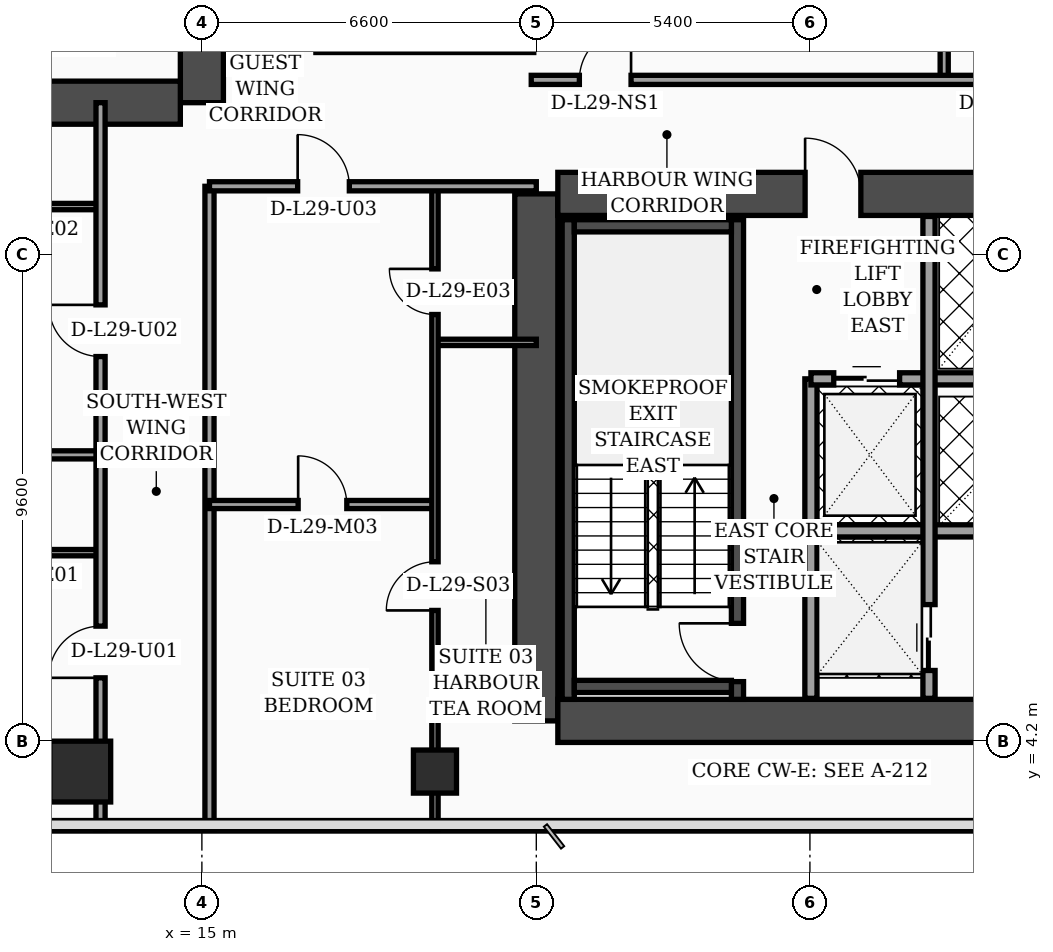
"""IFC4 building model, lengths in metres.
Left out: names, types, materials, properties, quantities, classifications, styles, units other than length and angle.
Written with IfcOpenShell. Run it as: python <this file> out.ifc"""

import sys

from ifc_helpers import new_model, si_unit, direction, frame, frame_2d, origin, origin_2d, place, context, subcontext, project, spatial, rectangle, hollow_rectangle, extrude, element, fill, save


model = new_model("IFC4")
c1 = context("Model", 3, precision=1e-05, world=origin(), true_north=direction((0.0, 1.0)))
c2 = subcontext(c1, "Body", "Model", "MODEL_VIEW")
j1 = project(units=[si_unit("LENGTHUNIT", "METRE"), si_unit("PLANEANGLEUNIT", "RADIAN")], contexts=[c1])
p1 = place(None, origin())
s1 = spatial("IfcSite", under=j1, at=p1, CompositionType="ELEMENT")
p2 = place(p1, origin())
s2 = spatial("IfcBuilding", under=s1, at=p2, CompositionType="ELEMENT")
p3 = place(p2, frame((0.0, 0.0, 120.2)))
s3 = spatial("IfcBuildingStorey", under=s2, at=p3, CompositionType="ELEMENT", Elevation=120.2)
p4 = place(p3, frame((15.0, 16.8, 0.0), z_axis=(0.0, 0.0, 1.0), x_axis=(0.0, 1.0, 0.0)))
e1 = element("IfcWall", 1, at=p4, inside=s3, PredefinedType="SHEAR", context=c2, shape_type="SweptSolid", body=[
    extrude(rectangle(XDim=21.6, YDim=0.85, at=frame_2d((10.8, 0.0))), origin(), (0.0, 0.0, 1.0), 3.56),
])
p5 = place(p4, frame((8.65, 0.0, 0.0)))
e2 = element("IfcOpeningElement", 2, at=p5, cuts=e1, PredefinedType="OPENING", context=c2, shape_type="SweptSolid", body=[
    extrude(rectangle(XDim=1.1, YDim=2.2, at=frame_2d((0.55, 1.1))), frame((0.0, 0.435, 0.0), z_axis=(0.0, -1.0, 0.0), x_axis=(1.0, 0.0, 0.0)), (0.0, 0.0, 1.0), 0.87),
])
p6 = place(p4, frame((10.85, 0.0, 0.0)))
e3 = element("IfcOpeningElement", 3, at=p6, cuts=e1, PredefinedType="OPENING", context=c2, shape_type="SweptSolid", body=[
    extrude(rectangle(XDim=1.1, YDim=2.2, at=frame_2d((0.55, 1.1))), frame((0.0, 0.435, 0.0), z_axis=(0.0, -1.0, 0.0), x_axis=(1.0, 0.0, 0.0)), (0.0, 0.0, 1.0), 0.87),
])
p7 = place(p4, frame((13.5, 0.0, 0.0)))
e4 = element("IfcOpeningElement", 4, at=p7, cuts=e1, PredefinedType="OPENING", context=c2, shape_type="SweptSolid", body=[
    extrude(rectangle(XDim=1.1, YDim=2.2, at=frame_2d((0.55, 1.1))), frame((0.0, 0.435, 0.0), z_axis=(0.0, -1.0, 0.0), x_axis=(1.0, 0.0, 0.0)), (0.0, 0.0, 1.0), 0.87),
])
p8 = place(p4, frame((16.15, 0.0, 0.0)))
e5 = element("IfcOpeningElement", 5, at=p8, cuts=e1, PredefinedType="OPENING", context=c2, shape_type="SweptSolid", body=[
    extrude(rectangle(XDim=1.1, YDim=2.2, at=frame_2d((0.55, 1.1))), frame((0.0, 0.435, 0.0), z_axis=(0.0, -1.0, 0.0), x_axis=(1.0, 0.0, 0.0)), (0.0, 0.0, 1.0), 0.87),
])
p9 = place(p3, frame((4.625, 16.8, 0.0), z_axis=(0.0, 0.0, 1.0), x_axis=(1.0, 0.0, 0.0)))
e6 = element("IfcWall", 6, at=p9, inside=s3, PredefinedType="SHEAR", context=c2, shape_type="SweptSolid", body=[
    extrude(rectangle(XDim=9.95, YDim=0.85, at=frame_2d((4.975, 0.0))), origin(), (0.0, 0.0, 1.0), 3.56),
])
p10 = place(p3, frame((21.6, 4.6, 0.0), z_axis=(0.0, 0.0, 1.0), x_axis=(0.0, 1.0, 0.0)))
e7 = element("IfcWall", 7, at=p10, inside=s3, PredefinedType="SHEAR", context=c2, shape_type="SweptSolid", body=[
    extrude(rectangle(XDim=10.4, YDim=0.85, at=frame_2d((5.2, 0.0))), origin(), (0.0, 0.0, 1.0), 3.56),
])
p11 = place(p3, frame((22.025, 15.0, 0.0), z_axis=(0.0, 0.0, 1.0), x_axis=(1.0, 0.0, 0.0)))
e8 = element("IfcWall", 8, at=p11, inside=s3, PredefinedType="SHEAR", context=c2, shape_type="SweptSolid", body=[
    extrude(rectangle(XDim=9.95, YDim=0.85, at=frame_2d((4.975, 0.0))), origin(), (0.0, 0.0, 1.0), 3.56),
])
p12 = place(p11, frame((4.88, 0.0, 0.0)))
e9 = element("IfcOpeningElement", 9, at=p12, cuts=e8, PredefinedType="OPENING", context=c2, shape_type="SweptSolid", body=[
    extrude(rectangle(XDim=1.1, YDim=2.2, at=frame_2d((0.55, 1.1))), frame((0.0, 0.435, 0.0), z_axis=(0.0, -1.0, 0.0), x_axis=(1.0, 0.0, 0.0)), (0.0, 0.0, 1.0), 0.87),
])
p13 = place(p3, frame((22.025, 4.6, 0.0), z_axis=(0.0, 0.0, 1.0), x_axis=(1.0, 0.0, 0.0)))
e10 = element("IfcWall", 10, at=p13, inside=s3, PredefinedType="SHEAR", context=c2, shape_type="SweptSolid", body=[
    extrude(rectangle(XDim=9.95, YDim=0.85, at=frame_2d((4.975, 0.0))), origin(), (0.0, 0.0, 1.0), 3.56),
])
p14 = place(p3, frame((22.23, 5.025, 0.0), z_axis=(0.0, 0.0, 1.0), x_axis=(0.0, 1.0, 0.0)))
e11 = element("IfcWall", 11, at=p14, inside=s3, PredefinedType="SOLIDWALL", context=c2, shape_type="SweptSolid", body=[
    extrude(rectangle(XDim=9.465, YDim=0.24, at=frame_2d((4.732, 0.0))), origin(), (0.0, 0.0, 1.0), 3.56),
])
p15 = place(p3, frame((25.57, 5.025, 0.0), z_axis=(0.0, 0.0, 1.0), x_axis=(0.0, 1.0, 0.0)))
e12 = element("IfcWall", 12, at=p15, inside=s3, PredefinedType="SOLIDWALL", context=c2, shape_type="SweptSolid", body=[
    extrude(rectangle(XDim=9.465, YDim=0.24, at=frame_2d((4.732, 0.0))), origin(), (0.0, 0.0, 1.0), 3.56),
])
p16 = place(p15, frame((0.35, 0.0, 0.0)))
e13 = element("IfcOpeningElement", 13, at=p16, cuts=e12, PredefinedType="OPENING", context=c2, shape_type="SweptSolid", body=[
    extrude(rectangle(XDim=1.15, YDim=2.2, at=frame_2d((0.575, 1.1))), frame((0.0, 0.13, 0.0), z_axis=(0.0, -1.0, 0.0), x_axis=(1.0, 0.0, 0.0)), (0.0, 0.0, 1.0), 0.26),
])
for number, where, z_axis, x_axis in (
    (14, (22.35, 5.28, 0.0), (0.0, 0.0, 1.0), (1.0, 0.0, 0.0)),
    (15, (22.35, 14.37, 0.0), (0.0, 0.0, 1.0), (1.0, 0.0, 0.0)),
):
    element("IfcWall", number, at=place(p3, frame(where, z_axis=z_axis, x_axis=x_axis)), inside=s3, PredefinedType="SOLIDWALL", context=c2, shape_type="SweptSolid", body=[
        extrude(rectangle(XDim=3.1, YDim=0.24, at=frame_2d((1.55, 0.0))), origin(), (0.0, 0.0, 1.0), 3.56),
    ])
p17 = place(p3, frame((12.6, 3.6, 0.0), z_axis=(0.0, 0.0, 1.0), x_axis=(1.0, 0.0, 0.0)))
e16 = element("IfcColumn", 16, at=p17, inside=s3, PredefinedType="COLUMN", context=c2, shape_type="SweptSolid", body=[
    extrude(rectangle(XDim=1.2, YDim=1.2, at=origin_2d()), origin(), (0.0, 0.0, 1.0), 3.56),
])
p18 = place(p3, frame((19.6, 3.6, 0.0), z_axis=(0.0, 0.0, 1.0), x_axis=(1.0, 0.0, 0.0)))
e17 = element("IfcColumn", 17, at=p18, inside=s3, PredefinedType="COLUMN", context=c2, shape_type="SweptSolid", body=[
    extrude(hollow_rectangle(XDim=0.85, YDim=0.85, WallThickness=0.036, at=origin_2d()), origin(), (0.0, 0.0, 1.0), 3.56),
])
p19 = place(p3, frame((27.02, 5.045, 0.0), z_axis=(0.0, 0.0, 1.0), x_axis=(0.0, 1.0, 0.0)))
e18 = element("IfcWall", 18, at=p19, inside=s3, PredefinedType="SOLIDWALL", context=c2, shape_type="SweptSolid", body=[
    extrude(rectangle(XDim=6.305, YDim=0.24, at=frame_2d((3.153, 0.0))), origin(), (0.0, 0.0, 1.0), 3.56),
])
p20 = place(p3, frame((27.02, 11.35, 0.0), z_axis=(0.0, 0.0, 1.0), x_axis=(1.0, 0.0, 0.0)))
e19 = element("IfcWall", 19, at=p20, inside=s3, PredefinedType="SOLIDWALL", context=c2, shape_type="SweptSolid", body=[
    extrude(rectangle(XDim=4.935, YDim=0.24, at=frame_2d((2.468, 0.0))), origin(), (0.0, 0.0, 1.0), 3.56),
])
p21 = place(p20, frame((0.45, 0.0, 0.0)))
e20 = element("IfcOpeningElement", 20, at=p21, cuts=e19, PredefinedType="OPENING", context=c2, shape_type="SweptSolid", body=[
    extrude(rectangle(XDim=1.3, YDim=2.35, at=frame_2d((0.65, 1.175))), frame((0.0, 0.13, 0.0), z_axis=(0.0, -1.0, 0.0), x_axis=(1.0, 0.0, 0.0)), (0.0, 0.0, 1.0), 0.26),
])
p22 = place(p3, frame((27.02, 8.35, 0.0), z_axis=(0.0, 0.0, 1.0), x_axis=(1.0, 0.0, 0.0)))
e21 = element("IfcWall", 21, at=p22, inside=s3, PredefinedType="SOLIDWALL", context=c2, shape_type="SweptSolid", body=[
    extrude(rectangle(XDim=4.935, YDim=0.24, at=frame_2d((2.468, 0.0))), origin(), (0.0, 0.0, 1.0), 3.09),
])
p23 = place(p3, frame((29.35, 5.045, 0.0), z_axis=(0.0, 0.0, 1.0), x_axis=(0.0, 1.0, 0.0)))
e22 = element("IfcWall", 22, at=p23, inside=s3, PredefinedType="SOLIDWALL", context=c2, shape_type="SweptSolid", body=[
    extrude(rectangle(XDim=9.51, YDim=0.24, at=frame_2d((4.755, 0.0))), origin(), (0.0, 0.0, 1.0), 3.56),
])
p24 = place(p23, frame((0.55, 0.0, 0.0)))
e23 = element("IfcOpeningElement", 23, at=p24, cuts=e22, PredefinedType="OPENING", context=c2, shape_type="SweptSolid", body=[
    extrude(rectangle(XDim=1.3, YDim=2.35, at=frame_2d((0.65, 1.175))), frame((0.0, 0.13, 0.0), z_axis=(0.0, -1.0, 0.0), x_axis=(1.0, 0.0, 0.0)), (0.0, 0.0, 1.0), 0.26),
])
p25 = place(p3, frame((3.2, 7.92, 0.0), z_axis=(0.0, 0.0, 1.0), x_axis=(1.0, 0.0, 0.0)))
e24 = element("IfcWall", 24, at=p25, inside=s3, PredefinedType="PARTITIONING", context=c2, shape_type="SweptSolid", body=[
    extrude(rectangle(XDim=9.8, YDim=0.125, at=frame_2d((4.9, 0.0))), origin(), (0.0, 0.0, 1.0), 2.84),
])
p26 = place(p25, frame((3.32, 0.0, 0.0)))
e25 = element("IfcOpeningElement", 25, at=p26, cuts=e24, PredefinedType="OPENING", context=c2, shape_type="SweptSolid", body=[
    extrude(rectangle(XDim=0.96, YDim=2.2, at=frame_2d((0.48, 1.1))), frame((0.0, 0.073, 0.0), z_axis=(0.0, -1.0, 0.0), x_axis=(1.0, 0.0, 0.0)), (0.0, 0.0, 1.0), 0.145),
])
p27 = place(p25, frame((7.89, 0.0, 0.0)))
e26 = element("IfcOpeningElement", 26, at=p27, cuts=e24, PredefinedType="OPENING", context=c2, shape_type="SweptSolid", body=[
    extrude(rectangle(XDim=0.9, YDim=2.15, at=frame_2d((0.45, 1.075))), frame((0.0, 0.073, 0.0), z_axis=(0.0, -1.0, 0.0), x_axis=(1.0, 0.0, 0.0)), (0.0, 0.0, 1.0), 0.145),
])
p28 = place(p3, frame((0.08, 14.75, 0.0), z_axis=(0.0, 0.0, 1.0), x_axis=(1.0, 0.0, 0.0)))
e27 = element("IfcWall", 27, at=p28, inside=s3, PredefinedType="PARTITIONING", context=c2, shape_type="SweptSolid", body=[
    extrude(rectangle(XDim=12.92, YDim=0.125, at=frame_2d((6.46, 0.0))), origin(), (0.0, 0.0, 1.0), 2.84),
])
p29 = place(p28, frame((4.52, 0.0, 0.0)))
e28 = element("IfcOpeningElement", 28, at=p29, cuts=e27, PredefinedType="OPENING", context=c2, shape_type="SweptSolid", body=[
    extrude(rectangle(XDim=0.96, YDim=2.2, at=frame_2d((0.48, 1.1))), frame((0.0, 0.073, 0.0), z_axis=(0.0, -1.0, 0.0), x_axis=(1.0, 0.0, 0.0)), (0.0, 0.0, 1.0), 0.145),
])
p30 = place(p28, frame((11.01, 0.0, 0.0)))
e29 = element("IfcOpeningElement", 29, at=p30, cuts=e27, PredefinedType="OPENING", context=c2, shape_type="SweptSolid", body=[
    extrude(rectangle(XDim=0.9, YDim=2.15, at=frame_2d((0.45, 1.075))), frame((0.0, 0.073, 0.0), z_axis=(0.0, -1.0, 0.0), x_axis=(1.0, 0.0, 0.0)), (0.0, 0.0, 1.0), 0.145),
])
p31 = place(p3, frame((0.08, 9.85, 0.0), z_axis=(0.0, 0.0, 1.0), x_axis=(1.0, 0.0, 0.0)))
e30 = element("IfcWall", 30, at=p31, inside=s3, PredefinedType="PARTITIONING", context=c2, shape_type="SweptSolid", body=[
    extrude(rectangle(XDim=12.92, YDim=0.16, at=frame_2d((6.46, 0.0))), origin(), (0.0, 0.0, 1.0), 2.84),
])
p32 = place(p3, frame((13.0, 2.44, 0.0), z_axis=(0.0, 0.0, 1.0), x_axis=(0.0, 1.0, 0.0)))
e31 = element("IfcWall", 31, at=p32, inside=s3, PredefinedType="PARTITIONING", context=c2, shape_type="SweptSolid", body=[
    extrude(rectangle(XDim=14.36, YDim=0.18, at=frame_2d((7.18, 0.0))), origin(), (0.0, 0.0, 1.0), 2.84),
])
p33 = place(p32, frame((3.01, 0.0, 0.0)))
e32 = element("IfcOpeningElement", 32, at=p33, cuts=e31, PredefinedType="OPENING", context=c2, shape_type="SweptSolid", body=[
    extrude(rectangle(XDim=1.02, YDim=2.2, at=frame_2d((0.51, 1.1))), frame((0.0, 0.1, 0.0), z_axis=(0.0, -1.0, 0.0), x_axis=(1.0, 0.0, 0.0)), (0.0, 0.0, 1.0), 0.2),
])
p34 = place(p32, frame((9.35, 0.0, 0.0)))
e33 = element("IfcOpeningElement", 33, at=p34, cuts=e31, PredefinedType="OPENING", context=c2, shape_type="SweptSolid", body=[
    extrude(rectangle(XDim=1.02, YDim=2.2, at=frame_2d((0.51, 1.1))), frame((0.0, 0.1, 0.0), z_axis=(0.0, -1.0, 0.0), x_axis=(1.0, 0.0, 0.0)), (0.0, 0.0, 1.0), 0.2),
])
p35 = place(p3, frame((15.15, 2.44, 0.0), z_axis=(0.0, 0.0, 1.0), x_axis=(0.0, 1.0, 0.0)))
e34 = element("IfcWall", 34, at=p35, inside=s3, PredefinedType="PARTITIONING", context=c2, shape_type="SweptSolid", body=[
    extrude(rectangle(XDim=12.71, YDim=0.18, at=frame_2d((6.355, 0.0))), origin(), (0.0, 0.0, 1.0), 3.04),
])
p36 = place(p3, frame((19.6, 12.07, 0.0), z_axis=(0.0, 0.0, 1.0), x_axis=(1.0, 0.0, 0.0)))
e35 = element("IfcWall", 35, at=p36, inside=s3, PredefinedType="PARTITIONING", context=c2, shape_type="SweptSolid", body=[
    extrude(rectangle(XDim=2.0, YDim=0.125, at=frame_2d((1.0, 0.0))), origin(), (0.0, 0.0, 1.0), 3.56),
])
p37 = place(p3, frame((15.15, 8.87, 0.0), z_axis=(0.0, 0.0, 1.0), x_axis=(1.0, 0.0, 0.0)))
e36 = element("IfcWall", 36, at=p37, inside=s3, PredefinedType="PARTITIONING", context=c2, shape_type="SweptSolid", body=[
    extrude(rectangle(XDim=4.45, YDim=0.16, at=frame_2d((2.225, 0.0))), origin(), (0.0, 0.0, 1.0), 3.56),
])
p38 = place(p37, frame((1.75, 0.0, 0.0)))
e37 = element("IfcOpeningElement", 37, at=p38, cuts=e36, PredefinedType="OPENING", context=c2, shape_type="SweptSolid", body=[
    extrude(rectangle(XDim=0.96, YDim=2.2, at=frame_2d((0.48, 1.1))), frame((0.0, 0.09, 0.0), z_axis=(0.0, -1.0, 0.0), x_axis=(1.0, 0.0, 0.0)), (0.0, 0.0, 1.0), 0.18),
])
p39 = place(p3, frame((19.6, 2.44, 0.0), z_axis=(0.0, 0.0, 1.0), x_axis=(0.0, 1.0, 0.0)))
e38 = element("IfcWall", 38, at=p39, inside=s3, PredefinedType="PARTITIONING", context=c2, shape_type="SweptSolid", body=[
    extrude(rectangle(XDim=12.71, YDim=0.125, at=frame_2d((6.355, 0.0))), origin(), (0.0, 0.0, 1.0), 2.49),
])
p40 = place(p39, frame((4.34, 0.0, 0.0)))
e39 = element("IfcOpeningElement", 39, at=p40, cuts=e38, PredefinedType="OPENING", context=c2, shape_type="SweptSolid", body=[
    extrude(rectangle(XDim=0.96, YDim=2.2, at=frame_2d((0.48, 1.1))), frame((0.0, 0.073, 0.0), z_axis=(0.0, -1.0, 0.0), x_axis=(1.0, 0.0, 0.0)), (0.0, 0.0, 1.0), 0.145),
])
p41 = place(p39, frame((10.18, 0.0, 0.0)))
e40 = element("IfcOpeningElement", 40, at=p41, cuts=e38, PredefinedType="OPENING", context=c2, shape_type="SweptSolid", body=[
    extrude(rectangle(XDim=0.9, YDim=2.15, at=frame_2d((0.45, 1.075))), frame((0.0, 0.073, 0.0), z_axis=(0.0, -1.0, 0.0), x_axis=(1.0, 0.0, 0.0)), (0.0, 0.0, 1.0), 0.145),
])
p42 = place(p3, frame((15.15, 15.15, 0.0), z_axis=(0.0, 0.0, 1.0), x_axis=(1.0, 0.0, 0.0)))
e41 = element("IfcWall", 41, at=p42, inside=s3, PredefinedType="PARTITIONING", context=c2, shape_type="SweptSolid", body=[
    extrude(rectangle(XDim=6.45, YDim=0.18, at=frame_2d((3.225, 0.0))), origin(), (0.0, 0.0, 1.0), 2.49),
])
p43 = place(p42, frame((1.74, 0.0, 0.0)))
e42 = element("IfcOpeningElement", 42, at=p43, cuts=e41, PredefinedType="OPENING", context=c2, shape_type="SweptSolid", body=[
    extrude(rectangle(XDim=1.02, YDim=2.2, at=frame_2d((0.51, 1.1))), frame((0.0, 0.1, 0.0), z_axis=(0.0, -1.0, 0.0), x_axis=(1.0, 0.0, 0.0)), (0.0, 0.0, 1.0), 0.2),
])
p44 = place(p3, frame((17.25, 17.88, 0.0), z_axis=(0.0, 0.0, 1.0), x_axis=(1.0, 0.0, 0.0)))
e43 = element("IfcWall", 43, at=p44, inside=s3, PredefinedType="PARTITIONING", context=c2, shape_type="SweptSolid", body=[
    extrude(rectangle(XDim=4.3, YDim=0.18, at=frame_2d((2.15, 0.0))), origin(), (0.0, 0.0, 1.0), 3.56),
])
p45 = place(p3, frame((29.65, 17.25, 0.0), z_axis=(0.0, 0.0, 1.0), x_axis=(0.0, 1.0, 0.0)))
e44 = element("IfcWall", 44, at=p45, inside=s3, PredefinedType="PARTITIONING", context=c2, shape_type="SweptSolid", body=[
    extrude(rectangle(XDim=11.72, YDim=0.16, at=frame_2d((5.86, 0.0))), origin(), (0.0, 0.0, 1.0), 2.84),
])
p46 = place(p3, frame((21.5, 17.25, 0.0), z_axis=(0.0, 0.0, 1.0), x_axis=(1.0, 0.0, 0.0)))
e45 = element("IfcWall", 45, at=p46, inside=s3, PredefinedType="PARTITIONING", context=c2, shape_type="SweptSolid", body=[
    extrude(rectangle(XDim=24.25, YDim=0.18, at=frame_2d((12.125, 0.0))), origin(), (0.0, 0.0, 1.0), 2.84),
])
p47 = place(p46, frame((0.95, 0.0, 0.0)))
e46 = element("IfcOpeningElement", 46, at=p47, cuts=e45, PredefinedType="OPENING", context=c2, shape_type="SweptSolid", body=[
    extrude(rectangle(XDim=1.02, YDim=2.2, at=frame_2d((0.51, 1.1))), frame((0.0, 0.1, 0.0), z_axis=(0.0, -1.0, 0.0), x_axis=(1.0, 0.0, 0.0)), (0.0, 0.0, 1.0), 0.2),
])
p48 = place(p46, frame((9.0, 0.0, 0.0)))
e47 = element("IfcOpeningElement", 47, at=p48, cuts=e45, PredefinedType="OPENING", context=c2, shape_type="SweptSolid", body=[
    extrude(rectangle(XDim=1.02, YDim=2.2, at=frame_2d((0.51, 1.1))), frame((0.0, 0.1, 0.0), z_axis=(0.0, -1.0, 0.0), x_axis=(1.0, 0.0, 0.0)), (0.0, 0.0, 1.0), 0.2),
])
p49 = place(p46, frame((17.05, 0.0, 0.0)))
e48 = element("IfcOpeningElement", 48, at=p49, cuts=e45, PredefinedType="OPENING", context=c2, shape_type="SweptSolid", body=[
    extrude(rectangle(XDim=1.02, YDim=2.2, at=frame_2d((0.51, 1.1))), frame((0.0, 0.1, 0.0), z_axis=(0.0, -1.0, 0.0), x_axis=(1.0, 0.0, 0.0)), (0.0, 0.0, 1.0), 0.2),
])
p50 = place(p21, origin())
e49 = element("IfcDoor", 49, at=p50, inside=s3, OperationType="DOUBLE_DOOR_SLIDING", PredefinedType="DOOR", context=c2, shape_type="SweptSolid", body=[
    extrude(rectangle(XDim=1.3, YDim=2.35, at=frame_2d((0.65, 1.175))), frame((0.0, 0.025, 0.0), z_axis=(0.0, -1.0, 0.0), x_axis=(1.0, 0.0, 0.0)), (0.0, 0.0, 1.0), 0.05),
])
fill(e20, e49)
p51 = place(p24, origin())
e50 = element("IfcDoor", 50, at=p51, inside=s3, OperationType="DOUBLE_DOOR_SLIDING", PredefinedType="DOOR", context=c2, shape_type="SweptSolid", body=[
    extrude(rectangle(XDim=1.3, YDim=2.35, at=frame_2d((0.65, 1.175))), frame((0.0, 0.025, 0.0), z_axis=(0.0, -1.0, 0.0), x_axis=(1.0, 0.0, 0.0)), (0.0, 0.0, 1.0), 0.05),
])
fill(e23, e50)
p52 = place(p33, origin())
e51 = element("IfcDoor", 51, at=p52, inside=s3, OperationType="SINGLE_SWING_LEFT", PredefinedType="DOOR", context=c2, shape_type="SweptSolid", body=[
    extrude(rectangle(XDim=1.02, YDim=2.2, at=frame_2d((0.51, 1.1))), frame((0.0, 0.025, 0.0), z_axis=(0.0, -1.0, 0.0), x_axis=(1.0, 0.0, 0.0)), (0.0, 0.0, 1.0), 0.05),
])
fill(e32, e51)
p53 = place(p34, origin())
e52 = element("IfcDoor", 52, at=p53, inside=s3, OperationType="SINGLE_SWING_RIGHT", PredefinedType="DOOR", context=c2, shape_type="SweptSolid", body=[
    extrude(rectangle(XDim=1.02, YDim=2.2, at=frame_2d((0.51, 1.1))), frame((0.0, 0.025, 0.0), z_axis=(0.0, -1.0, 0.0), x_axis=(1.0, 0.0, 0.0)), (0.0, 0.0, 1.0), 0.05),
])
fill(e33, e52)
p54 = place(p38, origin())
e53 = element("IfcDoor", 53, at=p54, inside=s3, OperationType="SINGLE_SWING_LEFT", PredefinedType="DOOR", context=c2, shape_type="SweptSolid", body=[
    extrude(rectangle(XDim=0.96, YDim=2.2, at=frame_2d((0.48, 1.1))), frame((0.0, 0.025, 0.0), z_axis=(0.0, -1.0, 0.0), x_axis=(1.0, 0.0, 0.0)), (0.0, 0.0, 1.0), 0.05),
])
fill(e37, e53)
p55 = place(p40, origin())
e54 = element("IfcDoor", 54, at=p55, inside=s3, OperationType="SINGLE_SWING_LEFT", PredefinedType="DOOR", context=c2, shape_type="SweptSolid", body=[
    extrude(rectangle(XDim=0.96, YDim=2.2, at=frame_2d((0.48, 1.1))), frame((0.0, 0.025, 0.0), z_axis=(0.0, -1.0, 0.0), x_axis=(1.0, 0.0, 0.0)), (0.0, 0.0, 1.0), 0.05),
])
fill(e39, e54)
p56 = place(p41, origin())
e55 = element("IfcDoor", 55, at=p56, inside=s3, OperationType="SINGLE_SWING_RIGHT", PredefinedType="DOOR", context=c2, shape_type="SweptSolid", body=[
    extrude(rectangle(XDim=0.9, YDim=2.15, at=frame_2d((0.45, 1.075))), frame((0.0, 0.025, 0.0), z_axis=(0.0, -1.0, 0.0), x_axis=(1.0, 0.0, 0.0)), (0.0, 0.0, 1.0), 0.05),
])
fill(e40, e55)
p57 = place(p43, origin())
e56 = element("IfcDoor", 56, at=p57, inside=s3, OperationType="SINGLE_SWING_LEFT", PredefinedType="DOOR", context=c2, shape_type="SweptSolid", body=[
    extrude(rectangle(XDim=1.02, YDim=2.2, at=frame_2d((0.51, 1.1))), frame((0.0, 0.025, 0.0), z_axis=(0.0, -1.0, 0.0), x_axis=(1.0, 0.0, 0.0)), (0.0, 0.0, 1.0), 0.05),
])
fill(e42, e56)
p58 = place(p47, origin())
e57 = element("IfcDoor", 57, at=p58, inside=s3, OperationType="SINGLE_SWING_RIGHT", PredefinedType="DOOR", context=c2, shape_type="SweptSolid", body=[
    extrude(rectangle(XDim=1.02, YDim=2.2, at=frame_2d((0.51, 1.1))), frame((0.0, 0.025, 0.0), z_axis=(0.0, -1.0, 0.0), x_axis=(1.0, 0.0, 0.0)), (0.0, 0.0, 1.0), 0.05),
])
fill(e46, e57)
p59 = place(p16, origin())
e58 = element("IfcDoor", 58, at=p59, inside=s3, OperationType="SINGLE_SWING_RIGHT", PredefinedType="DOOR", context=c2, shape_type="SweptSolid", body=[
    extrude(rectangle(XDim=1.15, YDim=2.2, at=frame_2d((0.575, 1.1))), frame((0.0, 0.025, 0.0), z_axis=(0.0, -1.0, 0.0), x_axis=(1.0, 0.0, 0.0)), (0.0, 0.0, 1.0), 0.05),
])
fill(e13, e58)
p60 = place(p12, origin())
e59 = element("IfcDoor", 59, at=p60, inside=s3, OperationType="SINGLE_SWING_LEFT", PredefinedType="DOOR", context=c2, shape_type="SweptSolid", body=[
    extrude(rectangle(XDim=1.1, YDim=2.2, at=frame_2d((0.55, 1.1))), frame((0.0, 0.025, 0.0), z_axis=(0.0, -1.0, 0.0), x_axis=(1.0, 0.0, 0.0)), (0.0, 0.0, 1.0), 0.05),
])
fill(e9, e59)
save(model, sys.argv[1])
